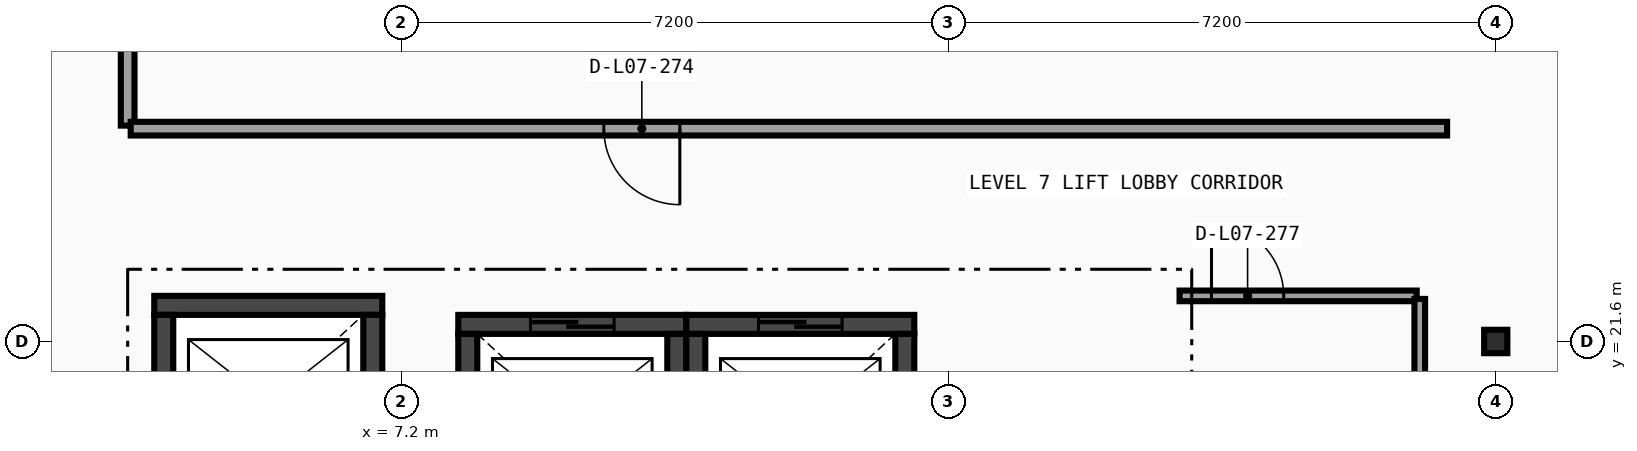
"""IFC4 building model, lengths in metres.
Left out: names, types, materials, properties, quantities, classifications, styles, units other than length and angle.
Written with IfcOpenShell. Run it as: python <this file> out.ifc"""

import sys

from ifc_helpers import new_model, si_unit, direction, frame, frame_2d, origin, origin_2d, place, context, subcontext, project, spatial, rectangle, i_section, extrude, element, fill, save


model = new_model("IFC4")
c1 = context("Model", 3, precision=1e-05, world=origin(), true_north=direction((0.0, 1.0)))
c2 = subcontext(c1, "Body", "Model", "MODEL_VIEW")
j1 = project(units=[si_unit("LENGTHUNIT", "METRE"), si_unit("PLANEANGLEUNIT", "RADIAN")], contexts=[c1])
p1 = place(None, origin())
s1 = spatial("IfcSite", under=j1, at=p1, CompositionType="ELEMENT")
p2 = place(p1, origin())
s2 = spatial("IfcBuilding", under=s1, at=p2, CompositionType="ELEMENT")
p3 = place(p2, frame((0.0, 0.0, 31.05)))
s3 = spatial("IfcBuildingStorey", under=s2, at=p3, CompositionType="ELEMENT", Elevation=31.05)
p4 = place(p3, frame((21.6, 21.6, 0.0), z_axis=(0.0, 0.0, 1.0), x_axis=(1.0, 0.0, 0.0)))
e1 = element("IfcColumn", 1, at=p4, inside=s3, PredefinedType="COLUMN", context=c2, shape_type="SweptSolid", body=[
    extrude(i_section(OverallWidth=0.305, OverallDepth=0.308, WebThickness=0.01, FlangeThickness=0.015, FilletRadius=0.015, at=origin_2d()), origin(), (0.0, 0.0, 1.0), 4.2),
])
p5 = place(p3, frame((6.95, 22.075, 0.0), z_axis=(0.0, 0.0, 1.0), x_axis=(-1.0, 0.0, 0.0)))
e2 = element("IfcWall", 2, at=p5, inside=s3, PredefinedType="SHEAR", context=c2, shape_type="SweptSolid", body=[
    extrude(rectangle(XDim=3.0, YDim=0.25, at=frame_2d((1.5, 0.0))), origin(), (0.0, 0.0, 1.0), 3.95),
])
for number, where, z_axis, x_axis in (
    (3, (4.075, 21.95, 0.0), (0.0, 0.0, 1.0), (0.0, -1.0, 0.0)),
    (4, (6.825, 19.65, 0.0), (0.0, 0.0, 1.0), (0.0, 1.0, 0.0)),
):
    element("IfcWall", number, at=place(p3, frame(where, z_axis=z_axis, x_axis=x_axis)), inside=s3, PredefinedType="SHEAR", context=c2, shape_type="SweptSolid", body=[
        extrude(rectangle(XDim=2.3, YDim=0.25, at=frame_2d((1.15, 0.0))), origin(), (0.0, 0.0, 1.0), 3.95),
    ])
p6 = place(p3, frame((10.95, 21.825, 0.0), z_axis=(0.0, 0.0, 1.0), x_axis=(-1.0, 0.0, 0.0)))
e5 = element("IfcWall", 5, at=p6, inside=s3, PredefinedType="SHEAR", context=c2, shape_type="SweptSolid", body=[
    extrude(rectangle(XDim=3.0, YDim=0.25, at=frame_2d((1.5, 0.0))), origin(), (0.0, 0.0, 1.0), 3.95),
])
p7 = place(p6, frame((0.95, 0.0, 0.0)))
e6 = element("IfcOpeningElement", 6, at=p7, cuts=e5, PredefinedType="OPENING", context=c2, shape_type="SweptSolid", body=[
    extrude(rectangle(XDim=1.1, YDim=2.1, at=frame_2d((0.55, 1.05))), frame((0.0, 0.135, 0.0), z_axis=(0.0, -1.0, 0.0), x_axis=(1.0, 0.0, 0.0)), (0.0, 0.0, 1.0), 0.27),
])
for number, where, z_axis, x_axis in (
    (7, (8.075, 21.7, 0.0), (0.0, 0.0, 1.0), (0.0, -1.0, 0.0)),
    (8, (10.825, 19.4, 0.0), (0.0, 0.0, 1.0), (0.0, 1.0, 0.0)),
):
    element("IfcWall", number, at=place(p3, frame(where, z_axis=z_axis, x_axis=x_axis)), inside=s3, PredefinedType="SHEAR", context=c2, shape_type="SweptSolid", body=[
        extrude(rectangle(XDim=2.3, YDim=0.25, at=frame_2d((1.15, 0.0))), origin(), (0.0, 0.0, 1.0), 3.95),
    ])
p8 = place(p3, frame((13.95, 21.825, 0.0), z_axis=(0.0, 0.0, 1.0), x_axis=(-1.0, 0.0, 0.0)))
e9 = element("IfcWall", 9, at=p8, inside=s3, PredefinedType="SHEAR", context=c2, shape_type="SweptSolid", body=[
    extrude(rectangle(XDim=3.0, YDim=0.25, at=frame_2d((1.5, 0.0))), origin(), (0.0, 0.0, 1.0), 3.95),
])
p9 = place(p8, frame((0.95, 0.0, 0.0)))
e10 = element("IfcOpeningElement", 10, at=p9, cuts=e9, PredefinedType="OPENING", context=c2, shape_type="SweptSolid", body=[
    extrude(rectangle(XDim=1.1, YDim=2.1, at=frame_2d((0.55, 1.05))), frame((0.0, 0.135, 0.0), z_axis=(0.0, -1.0, 0.0), x_axis=(1.0, 0.0, 0.0)), (0.0, 0.0, 1.0), 0.27),
])
for number, where, z_axis, x_axis in (
    (11, (11.075, 21.7, 0.0), (0.0, 0.0, 1.0), (0.0, -1.0, 0.0)),
    (12, (13.825, 19.4, 0.0), (0.0, 0.0, 1.0), (0.0, 1.0, 0.0)),
):
    element("IfcWall", number, at=place(p3, frame(where, z_axis=z_axis, x_axis=x_axis)), inside=s3, PredefinedType="SHEAR", context=c2, shape_type="SweptSolid", body=[
        extrude(rectangle(XDim=2.3, YDim=0.25, at=frame_2d((1.15, 0.0))), origin(), (0.0, 0.0, 1.0), 3.95),
    ])
p10 = place(p3, frame((3.6, 24.44, 0.0), z_axis=(0.0, 0.0, 1.0), x_axis=(0.0, 1.0, 0.0)))
e13 = element("IfcWall", 13, at=p10, inside=s3, PredefinedType="PARTITIONING", context=c2, shape_type="SweptSolid", body=[
    extrude(rectangle(XDim=3.92, YDim=0.18, at=frame_2d((1.96, 0.0))), origin(), (0.0, 0.0, 1.0), 3.95),
])
p11 = place(p3, frame((3.64, 24.4, 0.0), z_axis=(0.0, 0.0, 1.0), x_axis=(1.0, 0.0, 0.0)))
e14 = element("IfcWall", 14, at=p11, inside=s3, PredefinedType="PARTITIONING", context=c2, shape_type="SweptSolid", body=[
    extrude(rectangle(XDim=17.32, YDim=0.18, at=frame_2d((8.66, 0.0))), origin(), (0.0, 0.0, 1.0), 3.95),
])
p12 = place(p11, frame((6.225, 0.0, 0.0)))
e15 = element("IfcOpeningElement", 15, at=p12, cuts=e14, PredefinedType="OPENING", context=c2, shape_type="SweptSolid", body=[
    extrude(rectangle(XDim=1.0, YDim=2.1, at=frame_2d((0.5, 1.05))), frame((0.0, 0.1, 0.0), z_axis=(0.0, -1.0, 0.0), x_axis=(1.0, 0.0, 0.0)), (0.0, 0.0, 1.0), 0.2),
])
p13 = place(p3, frame((17.44, 22.2, 0.0), z_axis=(0.0, 0.0, 1.0), x_axis=(1.0, 0.0, 0.0)))
e16 = element("IfcWall", 16, at=p13, inside=s3, PredefinedType="PARTITIONING", context=c2, shape_type="SweptSolid", body=[
    extrude(rectangle(XDim=3.12, YDim=0.14, at=frame_2d((1.56, 0.0))), origin(), (0.0, 0.0, 1.0), 3.95),
])
p14 = place(p13, frame((0.42, 0.0, 0.0)))
e17 = element("IfcOpeningElement", 17, at=p14, cuts=e16, PredefinedType="OPENING", context=c2, shape_type="SweptSolid", body=[
    extrude(rectangle(XDim=0.95, YDim=2.08, at=frame_2d((0.475, 1.04))), frame((0.0, 0.08, 0.0), z_axis=(0.0, -1.0, 0.0), x_axis=(1.0, 0.0, 0.0)), (0.0, 0.0, 1.0), 0.16),
])
p15 = place(p3, frame((20.6, 18.44, 0.0), z_axis=(0.0, 0.0, 1.0), x_axis=(0.0, 1.0, 0.0)))
e18 = element("IfcWall", 18, at=p15, inside=s3, PredefinedType="PARTITIONING", context=c2, shape_type="SweptSolid", body=[
    extrude(rectangle(XDim=3.72, YDim=0.14, at=frame_2d((1.86, 0.0))), origin(), (0.0, 0.0, 1.0), 3.95),
])
p16 = place(p7, origin())
e19 = element("IfcDoor", 19, at=p16, inside=s3, OperationType="SLIDING_TO_LEFT", PredefinedType="DOOR", context=c2, shape_type="SweptSolid", body=[
    extrude(rectangle(XDim=1.1, YDim=2.1, at=frame_2d((0.55, 1.05))), frame((0.0, 0.025, 0.0), z_axis=(0.0, -1.0, 0.0), x_axis=(1.0, 0.0, 0.0)), (0.0, 0.0, 1.0), 0.05),
])
fill(e6, e19)
p17 = place(p9, origin())
e20 = element("IfcDoor", 20, at=p17, inside=s3, OperationType="SLIDING_TO_LEFT", PredefinedType="DOOR", context=c2, shape_type="SweptSolid", body=[
    extrude(rectangle(XDim=1.1, YDim=2.1, at=frame_2d((0.55, 1.05))), frame((0.0, 0.025, 0.0), z_axis=(0.0, -1.0, 0.0), x_axis=(1.0, 0.0, 0.0)), (0.0, 0.0, 1.0), 0.05),
])
fill(e10, e20)
p18 = place(p12, origin())
e21 = element("IfcDoor", 21, at=p18, inside=s3, OperationType="SINGLE_SWING_RIGHT", PredefinedType="DOOR", context=c2, shape_type="SweptSolid", body=[
    extrude(rectangle(XDim=1.0, YDim=2.1, at=frame_2d((0.5, 1.05))), frame((0.0, 0.025, 0.0), z_axis=(0.0, -1.0, 0.0), x_axis=(1.0, 0.0, 0.0)), (0.0, 0.0, 1.0), 0.05),
])
fill(e15, e21)
p19 = place(p14, origin())
e22 = element("IfcDoor", 22, at=p19, inside=s3, OperationType="SINGLE_SWING_LEFT", PredefinedType="DOOR", context=c2, shape_type="SweptSolid", body=[
    extrude(rectangle(XDim=0.95, YDim=2.08, at=frame_2d((0.475, 1.04))), frame((0.0, 0.025, 0.0), z_axis=(0.0, -1.0, 0.0), x_axis=(1.0, 0.0, 0.0)), (0.0, 0.0, 1.0), 0.05),
])
fill(e17, e22)
save(model, sys.argv[1])
